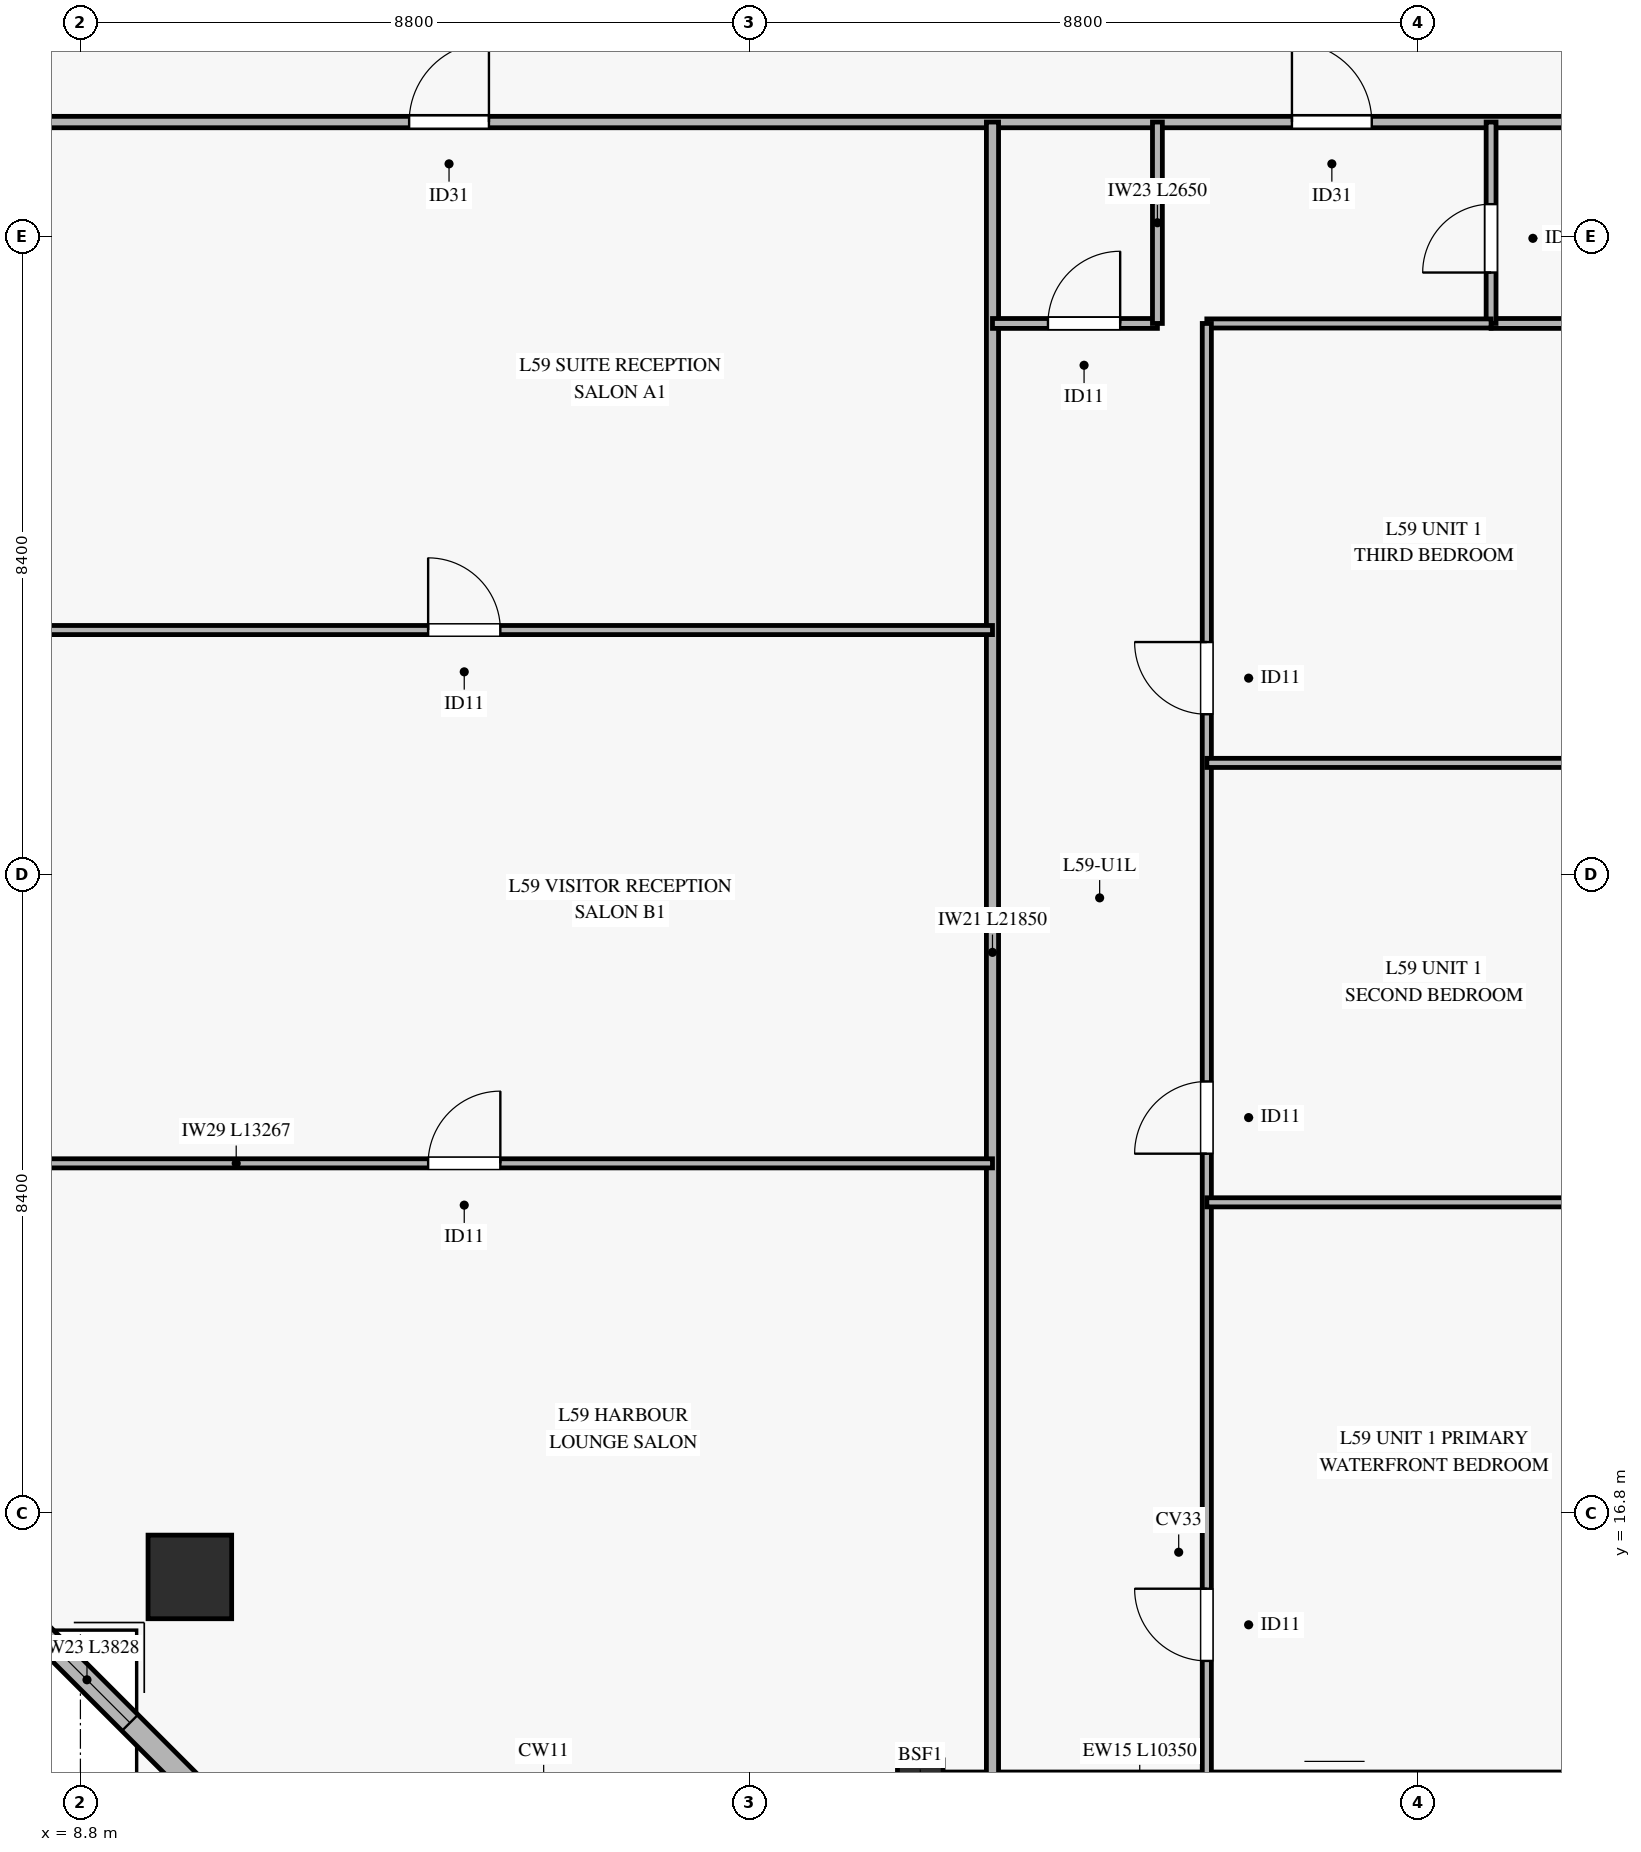
"""IFC4 building model, lengths in metres.
Left out: names, types, materials, properties, quantities, classifications, styles, units other than length and angle.
Written with IfcOpenShell. Run it as: python <this file> out.ifc"""

import sys

from ifc_helpers import new_model, si_unit, direction, frame, frame_2d, origin, origin_2d, place, context, subcontext, project, spatial, rectangle, hollow_rectangle, extrude, source, transform, mapped, element, fill, save


model = new_model("IFC4")
c1 = context("Model", 3, precision=1e-05, world=origin(), true_north=direction((0.0, 1.0)))
c2 = subcontext(c1, "Body", "Model", "MODEL_VIEW")
j1 = project(units=[si_unit("LENGTHUNIT", "METRE"), si_unit("PLANEANGLEUNIT", "RADIAN")], contexts=[c1])
p1 = place(None, origin())
s1 = spatial("IfcSite", under=j1, at=p1, CompositionType="ELEMENT")
p2 = place(p1, origin())
s2 = spatial("IfcBuilding", under=s1, at=p2, CompositionType="ELEMENT")
p3 = place(p2, frame((0.0, 0.0, 233.8)))
s3 = spatial("IfcBuildingStorey", under=s2, at=p3, CompositionType="ELEMENT", Elevation=233.8)
m1 = source(origin(), c2, "Body", "SweptSolid", [
    extrude(hollow_rectangle(XDim=1.1, YDim=1.1, WallThickness=0.05, at=origin_2d()), origin(), (0.0, 0.0, 1.0), 3.264),
])
p4 = place(p3, frame((10.24, 15.957, 0.0), z_axis=(0.113014620919, 0.271429556131, 0.95580002695), x_axis=(-0.92317473482, 0.384380552305, 0.0)))
e1 = element("IfcColumn", 1, at=p4, inside=s3, PredefinedType="COLUMN", context=c2, shape_type="MappedRepresentation", body=[
    mapped(m1, transform((0.0, 0.0, 0.0), x_axis=(1.0, 0.0, 0.0), y_axis=(0.0, 1.0, 0.0), z_axis=(0.0, 0.0, 1.0), scale=1.0)),
])
m2 = source(origin(), c2, "Body", "SweptSolid", [
    extrude(hollow_rectangle(XDim=0.6, YDim=0.6, WallThickness=0.028, at=origin_2d()), origin(), (0.0, 0.0, 1.0), 3.256),
])
p5 = place(p3, frame((19.85, 13.25, 0.0), z_axis=(0.0, 0.28619890178, 0.958170229458), x_axis=(-1.0, 0.0, 0.0)))
e2 = element("IfcColumn", 2, at=p5, inside=s3, PredefinedType="COLUMN", context=c2, shape_type="MappedRepresentation", body=[
    mapped(m2, transform((0.0, 0.0, 0.0), x_axis=(1.0, 0.0, 0.0), y_axis=(0.0, 1.0, 0.0), z_axis=(0.0, 0.0, 1.0), scale=1.0)),
])
p6 = place(p3, frame((20.15, 13.25, 0.0), z_axis=(0.0, 0.0, 1.0), x_axis=(1.0, 0.0, 0.0)))
e3 = element("IfcWall", 3, at=p6, inside=s3, PredefinedType="SOLIDWALL", context=c2, shape_type="SweptSolid", body=[
    extrude(rectangle(XDim=10.35, YDim=0.28, at=frame_2d((5.175, 0.0))), origin(), (0.0, 0.0, 1.0), 2.75),
])
p7 = place(p6, frame((4.25, 0.0, 0.0)))
e4 = element("IfcOpeningElement", 4, at=p7, cuts=e3, PredefinedType="OPENING", context=c2, shape_type="SweptSolid", body=[
    extrude(rectangle(XDim=1.8, YDim=2.25, at=frame_2d((0.9, 1.125))), frame((0.0, 0.15, 0.0), z_axis=(0.0, -1.0, 0.0), x_axis=(1.0, 0.0, 0.0)), (0.0, 0.0, 1.0), 0.3),
])
p8 = place(p6, frame((1.27, 0.0, 0.45)))
e5 = element("IfcOpeningElement", 5, at=p8, cuts=e3, PredefinedType="OPENING", context=c2, shape_type="SweptSolid", body=[
    extrude(rectangle(XDim=1.6, YDim=2.0, at=frame_2d((0.8, 1.0))), frame((0.0, 0.15, 0.0), z_axis=(0.0, -1.0, 0.0), x_axis=(1.0, 0.0, 0.0)), (0.0, 0.0, 1.0), 0.3),
])
p9 = place(p6, frame((7.35, 0.0, 0.45)))
e6 = element("IfcOpeningElement", 6, at=p9, cuts=e3, PredefinedType="OPENING", context=c2, shape_type="SweptSolid", body=[
    extrude(rectangle(XDim=1.6, YDim=2.0, at=frame_2d((0.8, 1.0))), frame((0.0, 0.15, 0.0), z_axis=(0.0, -1.0, 0.0), x_axis=(1.0, 0.0, 0.0)), (0.0, 0.0, 1.0), 0.3),
])
p10 = place(p3, frame((7.533, 15.957, 0.0), z_axis=(0.0, 0.0, 1.0), x_axis=(0.707106781187, -0.707106781187, 0.0)))
e7 = element("IfcWall", 7, at=p10, inside=s3, PredefinedType="SOLIDWALL", context=c2, shape_type="SweptSolid", body=[
    extrude(rectangle(XDim=3.828, YDim=0.3, at=frame_2d((1.914, 0.0))), origin(), (0.0, 0.0, 1.0), 2.75),
])
p11 = place(p10, frame((1.114, 0.0, 0.45)))
e8 = element("IfcOpeningElement", 8, at=p11, cuts=e7, PredefinedType="OPENING", context=c2, shape_type="SweptSolid", body=[
    extrude(rectangle(XDim=1.6, YDim=2.0, at=frame_2d((0.8, 1.0))), frame((0.0, 0.16, 0.0), z_axis=(0.0, -1.0, 0.0), x_axis=(1.0, 0.0, 0.0)), (0.0, 0.0, 1.0), 0.32),
])
p12 = place(p3, frame((7.533, 35.1, 0.0), z_axis=(0.0, 0.0, 1.0), x_axis=(1.0, 0.0, 0.0)))
e9 = element("IfcWall", 9, at=p12, inside=s3, PredefinedType="PARTITIONING", context=c2, shape_type="SweptSolid", body=[
    extrude(rectangle(XDim=55.334, YDim=0.15, at=frame_2d((27.667, 0.0))), origin(), (0.0, 0.0, 1.0), 2.305),
])
p13 = place(p12, frame((5.592, 0.0, 0.0)))
e10 = element("IfcOpeningElement", 10, at=p13, cuts=e9, PredefinedType="OPENING", context=c2, shape_type="SweptSolid", body=[
    extrude(rectangle(XDim=1.05, YDim=2.15, at=frame_2d((0.525, 1.075))), frame((0.0, 0.085, 0.0), z_axis=(0.0, -1.0, 0.0), x_axis=(1.0, 0.0, 0.0)), (0.0, 0.0, 1.0), 0.17),
])
p14 = place(p12, frame((17.207, 0.0, 0.0)))
e11 = element("IfcOpeningElement", 11, at=p14, cuts=e9, PredefinedType="OPENING", context=c2, shape_type="SweptSolid", body=[
    extrude(rectangle(XDim=1.05, YDim=2.15, at=frame_2d((0.525, 1.075))), frame((0.0, 0.085, 0.0), z_axis=(0.0, -1.0, 0.0), x_axis=(1.0, 0.0, 0.0)), (0.0, 0.0, 1.0), 0.17),
])
p15 = place(p12, frame((25.884, 0.0, 0.0)))
e12 = element("IfcOpeningElement", 12, at=p15, cuts=e9, PredefinedType="OPENING", context=c2, shape_type="SweptSolid", body=[
    extrude(rectangle(XDim=1.05, YDim=2.15, at=frame_2d((0.525, 1.075))), frame((0.0, 0.085, 0.0), z_axis=(0.0, -1.0, 0.0), x_axis=(1.0, 0.0, 0.0)), (0.0, 0.0, 1.0), 0.17),
])
p16 = place(p12, frame((35.712, 0.0, 0.0)))
e13 = element("IfcOpeningElement", 13, at=p16, cuts=e9, PredefinedType="OPENING", context=c2, shape_type="SweptSolid", body=[
    extrude(rectangle(XDim=1.05, YDim=2.15, at=frame_2d((0.525, 1.075))), frame((0.0, 0.085, 0.0), z_axis=(0.0, -1.0, 0.0), x_axis=(1.0, 0.0, 0.0)), (0.0, 0.0, 1.0), 0.17),
])
p17 = place(p12, frame((46.92, 0.0, 0.0)))
e14 = element("IfcOpeningElement", 14, at=p17, cuts=e9, PredefinedType="OPENING", context=c2, shape_type="SweptSolid", body=[
    extrude(rectangle(XDim=1.05, YDim=2.15, at=frame_2d((0.525, 1.075))), frame((0.0, 0.085, 0.0), z_axis=(0.0, -1.0, 0.0), x_axis=(1.0, 0.0, 0.0)), (0.0, 0.0, 1.0), 0.17),
])
p18 = place(p3, frame((20.8, 13.25, 0.0), z_axis=(0.0, 0.0, 1.0), x_axis=(0.0, 1.0, 0.0)))
e15 = element("IfcWall", 15, at=p18, inside=s3, PredefinedType="PARTITIONING", context=c2, shape_type="SweptSolid", body=[
    extrude(rectangle(XDim=21.85, YDim=0.16, at=frame_2d((10.925, 0.0))), origin(), (0.0, 0.0, 1.0), 2.705),
])
p19 = place(p3, frame((7.533, 21.399, 0.0), z_axis=(0.0, 0.0, 1.0), x_axis=(1.0, 0.0, 0.0)))
e16 = element("IfcWall", 16, at=p19, inside=s3, PredefinedType="PARTITIONING", context=c2, shape_type="SweptSolid", body=[
    extrude(rectangle(XDim=13.267, YDim=0.12, at=frame_2d((6.634, 0.0))), origin(), (0.0, 0.0, 1.0), 2.305),
])
p20 = place(p19, frame((5.842, 0.0, 0.0)))
e17 = element("IfcOpeningElement", 17, at=p20, cuts=e16, PredefinedType="OPENING", context=c2, shape_type="SweptSolid", body=[
    extrude(rectangle(XDim=0.95, YDim=2.1, at=frame_2d((0.475, 1.05))), frame((0.0, 0.07, 0.0), z_axis=(0.0, -1.0, 0.0), x_axis=(1.0, 0.0, 0.0)), (0.0, 0.0, 1.0), 0.14),
])
p21 = place(p3, frame((7.533, 28.416, 0.0), z_axis=(0.0, 0.0, 1.0), x_axis=(1.0, 0.0, 0.0)))
e18 = element("IfcWall", 18, at=p21, inside=s3, PredefinedType="PARTITIONING", context=c2, shape_type="SweptSolid", body=[
    extrude(rectangle(XDim=13.267, YDim=0.12, at=frame_2d((6.634, 0.0))), origin(), (0.0, 0.0, 1.0), 2.305),
])
p22 = place(p21, frame((5.842, 0.0, 0.0)))
e19 = element("IfcOpeningElement", 19, at=p22, cuts=e18, PredefinedType="OPENING", context=c2, shape_type="SweptSolid", body=[
    extrude(rectangle(XDim=0.95, YDim=2.1, at=frame_2d((0.475, 1.05))), frame((0.0, 0.07, 0.0), z_axis=(0.0, -1.0, 0.0), x_axis=(1.0, 0.0, 0.0)), (0.0, 0.0, 1.0), 0.14),
])
p23 = place(p3, frame((20.8, 32.45, 0.0), z_axis=(0.0, 0.0, 1.0), x_axis=(1.0, 0.0, 0.0)))
e20 = element("IfcWall", 20, at=p23, inside=s3, PredefinedType="PARTITIONING", context=c2, shape_type="SweptSolid", body=[
    extrude(rectangle(XDim=2.17, YDim=0.13, at=frame_2d((1.085, 0.0))), origin(), (0.0, 0.0, 1.0), 3.12),
])
p24 = place(p23, frame((0.73, 0.0, 0.0)))
e21 = element("IfcOpeningElement", 21, at=p24, cuts=e20, PredefinedType="OPENING", context=c2, shape_type="SweptSolid", body=[
    extrude(rectangle(XDim=0.95, YDim=2.1, at=frame_2d((0.475, 1.05))), frame((0.0, 0.075, 0.0), z_axis=(0.0, -1.0, 0.0), x_axis=(1.0, 0.0, 0.0)), (0.0, 0.0, 1.0), 0.15),
])
p25 = place(p3, frame((22.97, 32.45, 0.0), z_axis=(0.0, 0.0, 1.0), x_axis=(0.0, 1.0, 0.0)))
e22 = element("IfcWall", 22, at=p25, inside=s3, PredefinedType="PARTITIONING", context=c2, shape_type="SweptSolid", body=[
    extrude(rectangle(XDim=2.65, YDim=0.13, at=frame_2d((1.325, 0.0))), origin(), (0.0, 0.0, 1.0), 2.705),
])
p26 = place(p3, frame((27.36, 32.45, 0.0), z_axis=(0.0, 0.0, 1.0), x_axis=(1.0, 0.0, 0.0)))
e23 = element("IfcWall", 23, at=p26, inside=s3, PredefinedType="PARTITIONING", context=c2, shape_type="SweptSolid", body=[
    extrude(rectangle(XDim=2.24, YDim=0.13, at=frame_2d((1.12, 0.0))), origin(), (0.0, 0.0, 1.0), 3.12),
])
p27 = place(p3, frame((27.36, 32.45, 0.0), z_axis=(0.0, 0.0, 1.0), x_axis=(0.0, 1.0, 0.0)))
e24 = element("IfcWall", 24, at=p27, inside=s3, PredefinedType="PARTITIONING", context=c2, shape_type="SweptSolid", body=[
    extrude(rectangle(XDim=2.65, YDim=0.13, at=frame_2d((1.325, 0.0))), origin(), (0.0, 0.0, 1.0), 2.705),
])
p28 = place(p27, frame((0.67, 0.0, 0.0)))
e25 = element("IfcOpeningElement", 25, at=p28, cuts=e24, PredefinedType="OPENING", context=c2, shape_type="SweptSolid", body=[
    extrude(rectangle(XDim=0.9, YDim=2.1, at=frame_2d((0.45, 1.05))), frame((0.0, 0.075, 0.0), z_axis=(0.0, -1.0, 0.0), x_axis=(1.0, 0.0, 0.0)), (0.0, 0.0, 1.0), 0.15),
])
p29 = place(p3, frame((23.62, 32.45, 0.0), z_axis=(0.0, 0.0, 1.0), x_axis=(1.0, 0.0, 0.0)))
e26 = element("IfcWall", 26, at=p29, inside=s3, PredefinedType="PARTITIONING", context=c2, shape_type="SweptSolid", body=[
    extrude(rectangle(XDim=3.74, YDim=0.12, at=frame_2d((1.87, 0.0))), origin(), (0.0, 0.0, 1.0), 3.12),
])
p30 = place(p3, frame((23.62, 13.25, 0.0), z_axis=(0.0, 0.0, 1.0), x_axis=(0.0, 1.0, 0.0)))
e27 = element("IfcWall", 27, at=p30, inside=s3, PredefinedType="PARTITIONING", context=c2, shape_type="SweptSolid", body=[
    extrude(rectangle(XDim=19.2, YDim=0.12, at=frame_2d((9.6, 0.0))), origin(), (0.0, 0.0, 1.0), 2.705),
])
p31 = place(p30, frame((1.602, 0.0, 0.0)))
e28 = element("IfcOpeningElement", 28, at=p31, cuts=e27, PredefinedType="OPENING", context=c2, shape_type="SweptSolid", body=[
    extrude(rectangle(XDim=0.95, YDim=2.1, at=frame_2d((0.475, 1.05))), frame((0.0, 0.07, 0.0), z_axis=(0.0, -1.0, 0.0), x_axis=(1.0, 0.0, 0.0)), (0.0, 0.0, 1.0), 0.14),
])
p32 = place(p30, frame((8.276, 0.0, 0.0)))
e29 = element("IfcOpeningElement", 29, at=p32, cuts=e27, PredefinedType="OPENING", context=c2, shape_type="SweptSolid", body=[
    extrude(rectangle(XDim=0.95, YDim=2.1, at=frame_2d((0.475, 1.05))), frame((0.0, 0.07, 0.0), z_axis=(0.0, -1.0, 0.0), x_axis=(1.0, 0.0, 0.0)), (0.0, 0.0, 1.0), 0.14),
])
p33 = place(p30, frame((14.058, 0.0, 0.0)))
e30 = element("IfcOpeningElement", 30, at=p33, cuts=e27, PredefinedType="OPENING", context=c2, shape_type="SweptSolid", body=[
    extrude(rectangle(XDim=0.95, YDim=2.1, at=frame_2d((0.475, 1.05))), frame((0.0, 0.07, 0.0), z_axis=(0.0, -1.0, 0.0), x_axis=(1.0, 0.0, 0.0)), (0.0, 0.0, 1.0), 0.14),
])
for number, where, z_axis, x_axis in (
    (31, (23.62, 20.886, 0.0), (0.0, 0.0, 1.0), (1.0, 0.0, 0.0)),
    (32, (23.62, 26.668, 0.0), (0.0, 0.0, 1.0), (1.0, 0.0, 0.0)),
):
    element("IfcWall", number, at=place(p3, frame(where, z_axis=z_axis, x_axis=x_axis)), inside=s3, PredefinedType="PARTITIONING", context=c2, shape_type="SweptSolid", body=[
        extrude(rectangle(XDim=5.98, YDim=0.12, at=frame_2d((2.99, 0.0))), origin(), (0.0, 0.0, 1.0), 3.12),
    ])
m3 = source(origin(), c2, "Body", "SweptSolid", [
    extrude(rectangle(XDim=1.6, YDim=2.0, at=frame_2d((0.8, 1.0))), frame((0.0, 0.03, 0.0), z_axis=(0.0, -1.0, 0.0), x_axis=(1.0, 0.0, 0.0)), (0.0, 0.0, 1.0), 0.06),
])
p34 = place(p11, origin())
e33 = element("IfcWindow", 33, at=p34, inside=s3, PartitioningType="SINGLE_PANEL", PredefinedType="WINDOW", context=c2, shape_type="MappedRepresentation", body=[
    mapped(m3, transform((0.0, 0.0, 0.0), x_axis=(1.0, 0.0, 0.0), y_axis=(0.0, 1.0, 0.0), z_axis=(0.0, 0.0, 1.0), scale=1.0)),
])
fill(e8, e33)
m4 = source(origin(), c2, "Body", "SweptSolid", [
    extrude(rectangle(XDim=1.05, YDim=2.15, at=frame_2d((0.525, 1.075))), frame((0.0, 0.025, 0.0), z_axis=(0.0, -1.0, 0.0), x_axis=(1.0, 0.0, 0.0)), (0.0, 0.0, 1.0), 0.05),
])
p35 = place(p13, origin())
e34 = element("IfcDoor", 34, at=p35, inside=s3, OperationType="SINGLE_SWING_RIGHT", PredefinedType="DOOR", context=c2, shape_type="MappedRepresentation", body=[
    mapped(m4, transform((0.0, 0.0, 0.0), x_axis=(1.0, 0.0, 0.0), y_axis=(0.0, 1.0, 0.0), z_axis=(0.0, 0.0, 1.0), scale=1.0)),
])
fill(e10, e34)
m5 = source(origin(), c2, "Body", "SweptSolid", [
    extrude(rectangle(XDim=0.95, YDim=2.1, at=frame_2d((0.475, 1.05))), frame((0.0, 0.025, 0.0), z_axis=(0.0, -1.0, 0.0), x_axis=(1.0, 0.0, 0.0)), (0.0, 0.0, 1.0), 0.05),
])
p36 = place(p22, origin())
e35 = element("IfcDoor", 35, at=p36, inside=s3, OperationType="SINGLE_SWING_LEFT", PredefinedType="DOOR", context=c2, shape_type="MappedRepresentation", body=[
    mapped(m5, transform((0.0, 0.0, 0.0), x_axis=(1.0, 0.0, 0.0), y_axis=(0.0, 1.0, 0.0), z_axis=(0.0, 0.0, 1.0), scale=1.0)),
])
fill(e19, e35)
p37 = place(p20, origin())
e36 = element("IfcDoor", 36, at=p37, inside=s3, OperationType="SINGLE_SWING_RIGHT", PredefinedType="DOOR", context=c2, shape_type="MappedRepresentation", body=[
    mapped(m5, transform((0.0, 0.0, 0.0), x_axis=(1.0, 0.0, 0.0), y_axis=(0.0, 1.0, 0.0), z_axis=(0.0, 0.0, 1.0), scale=1.0)),
])
fill(e17, e36)
p38 = place(p14, origin())
e37 = element("IfcDoor", 37, at=p38, inside=s3, OperationType="SINGLE_SWING_LEFT", PredefinedType="DOOR", context=c2, shape_type="MappedRepresentation", body=[
    mapped(m4, transform((0.0, 0.0, 0.0), x_axis=(1.0, 0.0, 0.0), y_axis=(0.0, 1.0, 0.0), z_axis=(0.0, 0.0, 1.0), scale=1.0)),
])
fill(e11, e37)
p39 = place(p24, origin())
e38 = element("IfcDoor", 38, at=p39, inside=s3, OperationType="SINGLE_SWING_RIGHT", PredefinedType="DOOR", context=c2, shape_type="MappedRepresentation", body=[
    mapped(m5, transform((0.0, 0.0, 0.0), x_axis=(1.0, 0.0, 0.0), y_axis=(0.0, 1.0, 0.0), z_axis=(0.0, 0.0, 1.0), scale=1.0)),
])
fill(e21, e38)
m6 = source(origin(), c2, "Body", "SweptSolid", [
    extrude(rectangle(XDim=0.9, YDim=2.1, at=frame_2d((0.45, 1.05))), frame((0.0, 0.025, 0.0), z_axis=(0.0, -1.0, 0.0), x_axis=(1.0, 0.0, 0.0)), (0.0, 0.0, 1.0), 0.05),
])
p40 = place(p28, origin())
e39 = element("IfcDoor", 39, at=p40, inside=s3, OperationType="SINGLE_SWING_LEFT", PredefinedType="DOOR", context=c2, shape_type="MappedRepresentation", body=[
    mapped(m6, transform((0.0, 0.0, 0.0), x_axis=(1.0, 0.0, 0.0), y_axis=(0.0, 1.0, 0.0), z_axis=(0.0, 0.0, 1.0), scale=1.0)),
])
fill(e25, e39)
p41 = place(p31, origin())
e40 = element("IfcDoor", 40, at=p41, inside=s3, OperationType="SINGLE_SWING_RIGHT", PredefinedType="DOOR", context=c2, shape_type="MappedRepresentation", body=[
    mapped(m5, transform((0.0, 0.0, 0.0), x_axis=(1.0, 0.0, 0.0), y_axis=(0.0, 1.0, 0.0), z_axis=(0.0, 0.0, 1.0), scale=1.0)),
])
fill(e28, e40)
p42 = place(p32, origin())
e41 = element("IfcDoor", 41, at=p42, inside=s3, OperationType="SINGLE_SWING_LEFT", PredefinedType="DOOR", context=c2, shape_type="MappedRepresentation", body=[
    mapped(m5, transform((0.0, 0.0, 0.0), x_axis=(1.0, 0.0, 0.0), y_axis=(0.0, 1.0, 0.0), z_axis=(0.0, 0.0, 1.0), scale=1.0)),
])
fill(e29, e41)
p43 = place(p33, origin())
e42 = element("IfcDoor", 42, at=p43, inside=s3, OperationType="SINGLE_SWING_RIGHT", PredefinedType="DOOR", context=c2, shape_type="MappedRepresentation", body=[
    mapped(m5, transform((0.0, 0.0, 0.0), x_axis=(1.0, 0.0, 0.0), y_axis=(0.0, 1.0, 0.0), z_axis=(0.0, 0.0, 1.0), scale=1.0)),
])
fill(e30, e42)
save(model, sys.argv[1])
